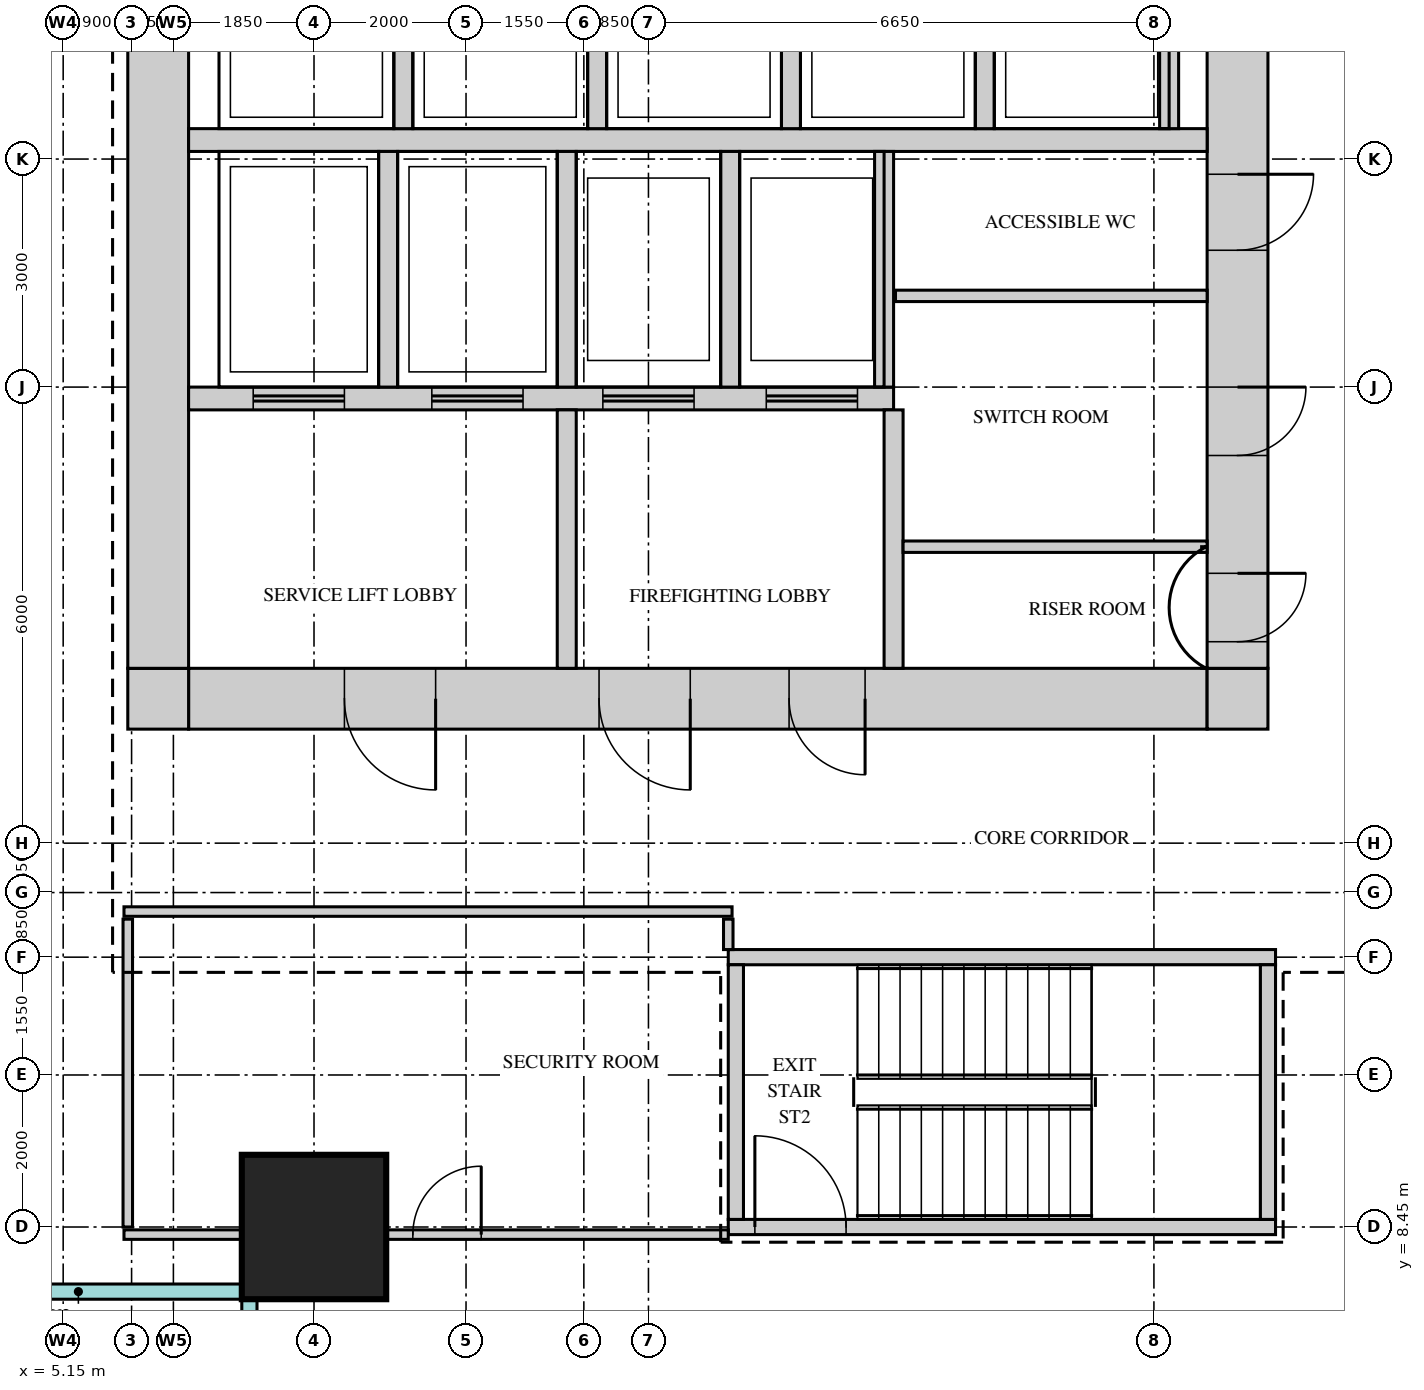
"""IFC4 building model, lengths in metres.
Left out: names, types, materials, properties, quantities, classifications, styles, units other than length and angle.
Written with IfcOpenShell. Run it as: python <this file> out.ifc"""

import sys

from ifc_helpers import new_model, si_unit, direction, frame, frame_2d, origin, origin_2d, place, context, subcontext, project, spatial, rectangle, extrude, source, transform, mapped, element, fill, save


model = new_model("IFC4")
c1 = context("Model", 3, precision=1e-05, world=origin(), true_north=direction((0.0, 1.0)))
c2 = subcontext(c1, "Body", "Model", "MODEL_VIEW")
j1 = project(units=[si_unit("LENGTHUNIT", "METRE"), si_unit("PLANEANGLEUNIT", "RADIAN")], contexts=[c1])
p1 = place(None, origin())
s1 = spatial("IfcSite", under=j1, at=p1, CompositionType="ELEMENT")
p2 = place(p1, origin())
s2 = spatial("IfcBuilding", under=s1, at=p2, CompositionType="ELEMENT")
p3 = place(p2, frame((0.0, 0.0, 204.7)))
s3 = spatial("IfcBuildingStorey", under=s2, at=p3, CompositionType="ELEMENT", Elevation=204.7)
m1 = source(origin(), c2, "Body", "SweptSolid", [
    extrude(rectangle(XDim=13.4, YDim=0.8, at=frame_2d((6.7, 0.0))), origin(), (0.0, 0.0, 1.0), 3.75),
])
p4 = place(p3, frame((6.8, 15.4, 0.0), z_axis=(0.0, 0.0, 1.0), x_axis=(1.0, 0.0, 0.0)))
e1 = element("IfcWall", 1, at=p4, inside=s3, PredefinedType="SHEAR", context=c2, shape_type="MappedRepresentation", body=[
    mapped(m1, transform((0.0, 0.0, 0.0))),
])
m2 = source(origin(), c2, "Body", "SweptSolid", [
    extrude(rectangle(XDim=1.2, YDim=2.1, at=frame_2d((0.6, 1.05))), frame((0.0, 0.41, 0.0), z_axis=(0.0, -1.0, 0.0), x_axis=(1.0, 0.0, 0.0)), (0.0, 0.0, 1.0), 0.82),
])
p5 = place(p4, frame((5.4, 0.0, 0.0)))
e2 = element("IfcOpeningElement", 2, at=p5, cuts=e1, PredefinedType="OPENING", context=c2, shape_type="MappedRepresentation", body=[
    mapped(m2, transform((0.0, 0.0, 0.0))),
])
p6 = place(p4, frame((2.05, 0.0, 0.0)))
e3 = element("IfcOpeningElement", 3, at=p6, cuts=e1, PredefinedType="OPENING", context=c2, shape_type="MappedRepresentation", body=[
    mapped(m2, transform((0.0, 0.0, 0.0))),
])
m3 = source(origin(), c2, "Body", "SweptSolid", [
    extrude(rectangle(XDim=1.0, YDim=2.1, at=frame_2d((0.5, 1.05))), frame((0.0, 0.41, 0.0), z_axis=(0.0, -1.0, 0.0), x_axis=(1.0, 0.0, 0.0)), (0.0, 0.0, 1.0), 0.82),
])
p7 = place(p4, frame((7.9, 0.0, 0.0)))
e4 = element("IfcOpeningElement", 4, at=p7, cuts=e1, PredefinedType="OPENING", context=c2, shape_type="MappedRepresentation", body=[
    mapped(m3, transform((0.0, 0.0, 0.0))),
])
m4 = source(origin(), c2, "Body", "SweptSolid", [
    extrude(rectangle(XDim=0.8, YDim=0.8, at=frame_2d((0.4, 0.0))), origin(), (0.0, 0.0, 1.0), 3.75),
])
for number, where, z_axis, x_axis in (
    (5, (20.2, 15.4, 0.0), (0.0, 0.0, 1.0), (1.0, 0.0, 0.0)),
    (6, (6.0, 15.4, 0.0), (0.0, 0.0, 1.0), (1.0, 0.0, 0.0)),
):
    element("IfcWall", number, at=place(p3, frame(where, z_axis=z_axis, x_axis=x_axis)), inside=s3, PredefinedType="SHEAR", context=c2, shape_type="MappedRepresentation", body=[
        mapped(m4, transform((0.0, 0.0, 0.0))),
    ])
m5 = source(origin(), c2, "Body", "SweptSolid", [
    extrude(rectangle(XDim=22.4, YDim=0.8, at=frame_2d((11.2, 0.0))), origin(), (0.0, 0.0, 1.0), 3.75),
])
p8 = place(p3, frame((20.6, 15.8, 0.0), z_axis=(0.0, 0.0, 1.0), x_axis=(0.0, 1.0, 0.0)))
e7 = element("IfcWall", 7, at=p8, inside=s3, PredefinedType="SHEAR", context=c2, shape_type="MappedRepresentation", body=[
    mapped(m5, transform((0.0, 0.0, 0.0))),
])
m6 = source(origin(), c2, "Body", "SweptSolid", [
    extrude(rectangle(XDim=1.8, YDim=2.1, at=frame_2d((0.9, 1.05))), frame((0.0, 0.41, 0.0), z_axis=(0.0, -1.0, 0.0), x_axis=(1.0, 0.0, 0.0)), (0.0, 0.0, 1.0), 0.82),
])
p9 = place(p8, frame((10.7, 0.0, 0.0)))
e8 = element("IfcOpeningElement", 8, at=p9, cuts=e7, PredefinedType="OPENING", context=c2, shape_type="MappedRepresentation", body=[
    mapped(m6, transform((0.0, 0.0, 0.0))),
])
m7 = source(origin(), c2, "Body", "SweptSolid", [
    extrude(rectangle(XDim=0.9, YDim=2.1, at=frame_2d((0.45, 1.05))), frame((0.0, 0.41, 0.0), z_axis=(0.0, -1.0, 0.0), x_axis=(1.0, 0.0, 0.0)), (0.0, 0.0, 1.0), 0.82),
])
p10 = place(p8, frame((0.35, 0.0, 0.0)))
e9 = element("IfcOpeningElement", 9, at=p10, cuts=e7, PredefinedType="OPENING", context=c2, shape_type="MappedRepresentation", body=[
    mapped(m7, transform((0.0, 0.0, 0.0))),
])
p11 = place(p8, frame((2.8, 0.0, 0.0)))
e10 = element("IfcOpeningElement", 10, at=p11, cuts=e7, PredefinedType="OPENING", context=c2, shape_type="MappedRepresentation", body=[
    mapped(m7, transform((0.0, 0.0, 0.0))),
])
p12 = place(p8, frame((5.5, 0.0, 0.0)))
e11 = element("IfcOpeningElement", 11, at=p12, cuts=e7, PredefinedType="OPENING", context=c2, shape_type="MappedRepresentation", body=[
    mapped(m3, transform((0.0, 0.0, 0.0))),
])
p13 = place(p3, frame((6.4, 15.8, 0.0), z_axis=(0.0, 0.0, 1.0), x_axis=(0.0, 1.0, 0.0)))
e12 = element("IfcWall", 12, at=p13, inside=s3, PredefinedType="SHEAR", context=c2, shape_type="MappedRepresentation", body=[
    mapped(m5, transform((0.0, 0.0, 0.0))),
])
m8 = source(origin(), c2, "Body", "SweptSolid", [
    extrude(rectangle(XDim=7.2, YDim=0.2, at=frame_2d((3.6, 0.0))), origin(), (0.0, 0.0, 1.0), 3.75),
])
p14 = place(p3, frame((13.9, 12.0, 0.0), z_axis=(0.0, 0.0, 1.0), x_axis=(1.0, 0.0, 0.0)))
e13 = element("IfcWall", 13, at=p14, inside=s3, PredefinedType="SHEAR", context=c2, shape_type="MappedRepresentation", body=[
    mapped(m8, transform((0.0, 0.0, 0.0))),
])
p15 = place(p3, frame((13.9, 8.45, 0.0), z_axis=(0.0, 0.0, 1.0), x_axis=(1.0, 0.0, 0.0)))
e14 = element("IfcWall", 14, at=p15, inside=s3, PredefinedType="SHEAR", context=c2, shape_type="MappedRepresentation", body=[
    mapped(m8, transform((0.0, 0.0, 0.0))),
])
m9 = source(origin(), c2, "Body", "SweptSolid", [
    extrude(rectangle(XDim=1.2, YDim=2.1, at=frame_2d((0.6, 1.05))), frame((0.0, 0.11, 0.0), z_axis=(0.0, -1.0, 0.0), x_axis=(1.0, 0.0, 0.0)), (0.0, 0.0, 1.0), 0.22),
])
p16 = place(p15, frame((0.35, 0.0, 0.0)))
e15 = element("IfcOpeningElement", 15, at=p16, cuts=e14, PredefinedType="OPENING", context=c2, shape_type="MappedRepresentation", body=[
    mapped(m9, transform((0.0, 0.0, 0.0))),
])
m10 = source(origin(), c2, "Body", "SweptSolid", [
    extrude(rectangle(XDim=3.35, YDim=0.2, at=frame_2d((1.675, 0.0))), origin(), (0.0, 0.0, 1.0), 3.75),
])
for number, where, z_axis, x_axis in (
    (16, (21.0, 8.55, 0.0), (0.0, 0.0, 1.0), (0.0, 1.0, 0.0)),
    (17, (14.0, 8.55, 0.0), (0.0, 0.0, 1.0), (0.0, 1.0, 0.0)),
):
    element("IfcWall", number, at=place(p3, frame(where, z_axis=z_axis, x_axis=x_axis)), inside=s3, PredefinedType="SHEAR", context=c2, shape_type="MappedRepresentation", body=[
        mapped(m10, transform((0.0, 0.0, 0.0))),
    ])
m11 = source(origin(), c2, "Body", "SweptSolid", [
    extrude(rectangle(XDim=13.4, YDim=0.3, at=frame_2d((6.7, 0.0))), origin(), (0.0, 0.0, 1.0), 3.75),
])
p17 = place(p3, frame((6.8, 22.75, 0.0), z_axis=(0.0, 0.0, 1.0), x_axis=(1.0, 0.0, 0.0)))
e18 = element("IfcWall", 18, at=p17, inside=s3, PredefinedType="STANDARD", context=c2, shape_type="MappedRepresentation", body=[
    mapped(m11, transform((0.0, 0.0, 0.0))),
])
m12 = source(origin(), c2, "Body", "SweptSolid", [
    extrude(rectangle(XDim=9.275, YDim=0.3, at=frame_2d((4.637, 0.0))), origin(), (0.0, 0.0, 1.0), 3.75),
])
p18 = place(p3, frame((6.8, 19.35, 0.0), z_axis=(0.0, 0.0, 1.0), x_axis=(1.0, 0.0, 0.0)))
e19 = element("IfcWall", 19, at=p18, inside=s3, PredefinedType="STANDARD", context=c2, shape_type="MappedRepresentation", body=[
    mapped(m12, transform((0.0, 0.0, 0.0))),
])
m13 = source(origin(), c2, "Body", "SweptSolid", [
    extrude(rectangle(XDim=1.2, YDim=2.1, at=frame_2d((0.6, 1.05))), frame((0.0, 0.16, 0.0), z_axis=(0.0, -1.0, 0.0), x_axis=(1.0, 0.0, 0.0)), (0.0, 0.0, 1.0), 0.32),
])
p19 = place(p18, frame((0.85, 0.0, 0.0)))
e20 = element("IfcOpeningElement", 20, at=p19, cuts=e19, PredefinedType="OPENING", context=c2, shape_type="MappedRepresentation", body=[
    mapped(m13, transform((0.0, 0.0, 0.0))),
])
p20 = place(p18, frame((3.2, 0.0, 0.0)))
e21 = element("IfcOpeningElement", 21, at=p20, cuts=e19, PredefinedType="OPENING", context=c2, shape_type="MappedRepresentation", body=[
    mapped(m13, transform((0.0, 0.0, 0.0))),
])
p21 = place(p18, frame((5.45, 0.0, 0.0)))
e22 = element("IfcOpeningElement", 22, at=p21, cuts=e19, PredefinedType="OPENING", context=c2, shape_type="MappedRepresentation", body=[
    mapped(m13, transform((0.0, 0.0, 0.0))),
])
p22 = place(p18, frame((7.6, 0.0, 0.0)))
e23 = element("IfcOpeningElement", 23, at=p22, cuts=e19, PredefinedType="OPENING", context=c2, shape_type="MappedRepresentation", body=[
    mapped(m13, transform((0.0, 0.0, 0.0))),
])
m14 = source(origin(), c2, "Body", "SweptSolid", [
    extrude(rectangle(XDim=3.1, YDim=0.25, at=frame_2d((1.55, 0.0))), origin(), (0.0, 0.0, 1.0), 3.75),
])
for number, where, z_axis, x_axis in (
    (24, (9.425, 19.5, 0.0), (0.0, 0.0, 1.0), (0.0, 1.0, 0.0)),
    (25, (11.775, 19.5, 0.0), (0.0, 0.0, 1.0), (0.0, 1.0, 0.0)),
    (26, (13.925, 19.5, 0.0), (0.0, 0.0, 1.0), (0.0, 1.0, 0.0)),
    (27, (15.95, 19.5, 0.0), (0.0, 0.0, 1.0), (0.0, 1.0, 0.0)),
):
    element("IfcWall", number, at=place(p3, frame(where, z_axis=z_axis, x_axis=x_axis)), inside=s3, PredefinedType="STANDARD", context=c2, shape_type="MappedRepresentation", body=[
        mapped(m14, transform((0.0, 0.0, 0.0))),
    ])
m15 = source(origin(), c2, "Body", "SweptSolid", [
    extrude(rectangle(XDim=2.4, YDim=0.25, at=frame_2d((1.2, 0.0))), origin(), (0.0, 0.0, 1.0), 3.75),
])
for number, where, z_axis, x_axis in (
    (28, (17.275, 22.9, 0.0), (0.0, 0.0, 1.0), (0.0, 1.0, 0.0)),
    (29, (19.7, 22.9, 0.0), (0.0, 0.0, 1.0), (0.0, 1.0, 0.0)),
    (30, (9.625, 22.9, 0.0), (0.0, 0.0, 1.0), (0.0, 1.0, 0.0)),
    (31, (12.175, 22.9, 0.0), (0.0, 0.0, 1.0), (0.0, 1.0, 0.0)),
    (32, (14.725, 22.9, 0.0), (0.0, 0.0, 1.0), (0.0, 1.0, 0.0)),
):
    element("IfcWall", number, at=place(p3, frame(where, z_axis=z_axis, x_axis=x_axis)), inside=s3, PredefinedType="STANDARD", context=c2, shape_type="MappedRepresentation", body=[
        mapped(m15, transform((0.0, 0.0, 0.0))),
    ])
m16 = source(origin(), c2, "Body", "SweptSolid", [
    extrude(rectangle(XDim=3.4, YDim=0.25, at=frame_2d((1.7, 0.0))), origin(), (0.0, 0.0, 1.0), 3.75),
])
for number, where, z_axis, x_axis in (
    (33, (16.075, 15.8, 0.0), (0.0, 0.0, 1.0), (0.0, 1.0, 0.0)),
    (34, (11.775, 15.8, 0.0), (0.0, 0.0, 1.0), (0.0, 1.0, 0.0)),
):
    element("IfcWall", number, at=place(p3, frame(where, z_axis=z_axis, x_axis=x_axis)), inside=s3, PredefinedType="STANDARD", context=c2, shape_type="MappedRepresentation", body=[
        mapped(m16, transform((0.0, 0.0, 0.0))),
    ])
m17 = source(origin(), c2, "Body", "SweptSolid", [
    extrude(rectangle(XDim=1.9, YDim=1.9, at=origin_2d()), origin(), (0.0, 0.0, 1.0), 4.0),
])
p23 = place(p3, frame((8.45, 8.45, 0.0), z_axis=(0.0, 0.0, 1.0), x_axis=(1.0, 0.0, 0.0)))
e35 = element("IfcColumn", 35, at=p23, inside=s3, PredefinedType="COLUMN", context=c2, shape_type="MappedRepresentation", body=[
    mapped(m17, transform((0.0, 0.0, 0.0))),
])
m18 = source(origin(), c2, "Body", "SweptSolid", [
    extrude(rectangle(XDim=7.95, YDim=0.125, at=frame_2d((3.975, 0.0))), origin(), (0.0, 0.0, 1.0), 3.25),
])
p24 = place(p3, frame((5.95, 8.35, 0.0), z_axis=(0.0, 0.0, 1.0), x_axis=(1.0, 0.0, 0.0)))
e36 = element("IfcWall", 36, at=p24, inside=s3, PredefinedType="PARTITIONING", context=c2, shape_type="MappedRepresentation", body=[
    mapped(m18, transform((0.0, 0.0, 0.0))),
])
m19 = source(origin(), c2, "Body", "SweptSolid", [
    extrude(rectangle(XDim=0.9, YDim=2.1, at=frame_2d((0.45, 1.05))), frame((0.0, 0.073, 0.0), z_axis=(0.0, -1.0, 0.0), x_axis=(1.0, 0.0, 0.0)), (0.0, 0.0, 1.0), 0.145),
])
p25 = place(p24, frame((3.8, 0.0, 0.0)))
e37 = element("IfcOpeningElement", 37, at=p25, cuts=e36, PredefinedType="OPENING", context=c2, shape_type="MappedRepresentation", body=[
    mapped(m19, transform((0.0, 0.0, 0.0))),
])
m20 = source(origin(), c2, "Body", "SweptSolid", [
    extrude(rectangle(XDim=4.05, YDim=0.125, at=frame_2d((2.025, 0.0))), origin(), (0.0, 0.0, 1.0), 3.8),
])
p26 = place(p3, frame((6.0, 8.45, 0.0), z_axis=(0.0, 0.0, 1.0), x_axis=(0.0, 1.0, 0.0)))
e38 = element("IfcWall", 38, at=p26, inside=s3, PredefinedType="PARTITIONING", context=c2, shape_type="MappedRepresentation", body=[
    mapped(m20, transform((0.0, 0.0, 0.0))),
])
m21 = source(origin(), c2, "Body", "SweptSolid", [
    extrude(rectangle(XDim=0.4, YDim=0.125, at=frame_2d((0.2, 0.0))), origin(), (0.0, 0.0, 1.0), 3.8),
])
p27 = place(p3, frame((13.9, 12.1, 0.0), z_axis=(0.0, 0.0, 1.0), x_axis=(0.0, 1.0, 0.0)))
e39 = element("IfcWall", 39, at=p27, inside=s3, PredefinedType="PARTITIONING", context=c2, shape_type="MappedRepresentation", body=[
    mapped(m21, transform((0.0, 0.0, 0.0))),
])
m22 = source(origin(), c2, "Body", "SweptSolid", [
    extrude(rectangle(XDim=8.0, YDim=0.125, at=frame_2d((4.0, 0.0))), origin(), (0.0, 0.0, 1.0), 3.8),
])
p28 = place(p3, frame((5.95, 12.6, 0.0), z_axis=(0.0, 0.0, 1.0), x_axis=(1.0, 0.0, 0.0)))
e40 = element("IfcWall", 40, at=p28, inside=s3, PredefinedType="PARTITIONING", context=c2, shape_type="MappedRepresentation", body=[
    mapped(m22, transform((0.0, 0.0, 0.0))),
])
m23 = source(origin(), c2, "Body", "SweptSolid", [
    extrude(rectangle(XDim=4.0, YDim=0.15, at=frame_2d((2.0, 0.0))), origin(), (0.0, 0.0, 1.0), 3.8),
])
p29 = place(p3, frame((16.2, 17.4, 0.0), z_axis=(0.0, 0.0, 1.0), x_axis=(1.0, 0.0, 0.0)))
e41 = element("IfcWall", 41, at=p29, inside=s3, PredefinedType="PARTITIONING", context=c2, shape_type="MappedRepresentation", body=[
    mapped(m23, transform((0.0, 0.0, 0.0))),
])
m24 = source(origin(), c2, "Body", "SweptSolid", [
    extrude(rectangle(XDim=4.1, YDim=0.15, at=frame_2d((2.05, 0.0))), origin(), (0.0, 0.0, 1.0), 3.8),
])
p30 = place(p3, frame((16.1, 20.7, 0.0), z_axis=(0.0, 0.0, 1.0), x_axis=(1.0, 0.0, 0.0)))
e42 = element("IfcWall", 42, at=p30, inside=s3, PredefinedType="PARTITIONING", context=c2, shape_type="MappedRepresentation", body=[
    mapped(m24, transform((0.0, 0.0, 0.0))),
])
m25 = source(origin(), c2, "Body", "SweptSolid", [
    extrude(rectangle(XDim=0.9, YDim=2.1, at=frame_2d((0.45, 1.05))), frame((0.0, 0.35, 0.0), z_axis=(0.0, -1.0, 0.0), x_axis=(1.0, 0.0, 0.0)), (0.0, 0.0, 1.0), 0.7),
])
p31 = place(p10, origin())
e43 = element("IfcDoor", 43, at=p31, inside=s3, OperationType="SINGLE_SWING_RIGHT", PredefinedType="DOOR", context=c2, shape_type="MappedRepresentation", body=[
    mapped(m25, transform((0.0, 0.0, 0.0))),
])
fill(e9, e43)
p32 = place(p11, origin())
e44 = element("IfcDoor", 44, at=p32, inside=s3, OperationType="SINGLE_SWING_RIGHT", PredefinedType="DOOR", context=c2, shape_type="MappedRepresentation", body=[
    mapped(m25, transform((0.0, 0.0, 0.0))),
])
fill(e10, e44)
m26 = source(origin(), c2, "Body", "SweptSolid", [
    extrude(rectangle(XDim=1.0, YDim=2.1, at=frame_2d((0.5, 1.05))), frame((0.0, 0.35, 0.0), z_axis=(0.0, -1.0, 0.0), x_axis=(1.0, 0.0, 0.0)), (0.0, 0.0, 1.0), 0.7),
])
p33 = place(p12, origin())
e45 = element("IfcDoor", 45, at=p33, inside=s3, OperationType="SINGLE_SWING_RIGHT", PredefinedType="DOOR", context=c2, shape_type="MappedRepresentation", body=[
    mapped(m26, transform((0.0, 0.0, 0.0))),
])
fill(e11, e45)
m27 = source(origin(), c2, "Body", "SweptSolid", [
    extrude(rectangle(XDim=1.2, YDim=2.1, at=frame_2d((0.6, 1.05))), frame((0.0, 0.35, 0.0), z_axis=(0.0, -1.0, 0.0), x_axis=(1.0, 0.0, 0.0)), (0.0, 0.0, 1.0), 0.7),
])
p34 = place(p5, origin())
e46 = element("IfcDoor", 46, at=p34, inside=s3, OperationType="SINGLE_SWING_RIGHT", PredefinedType="DOOR", context=c2, shape_type="MappedRepresentation", body=[
    mapped(m27, transform((0.0, 0.0, 0.0))),
])
fill(e2, e46)
p35 = place(p6, origin())
e47 = element("IfcDoor", 47, at=p35, inside=s3, OperationType="SINGLE_SWING_RIGHT", PredefinedType="DOOR", context=c2, shape_type="MappedRepresentation", body=[
    mapped(m27, transform((0.0, 0.0, 0.0))),
])
fill(e3, e47)
p36 = place(p7, origin())
e48 = element("IfcDoor", 48, at=p36, inside=s3, OperationType="SINGLE_SWING_RIGHT", PredefinedType="DOOR", context=c2, shape_type="MappedRepresentation", body=[
    mapped(m26, transform((0.0, 0.0, 0.0))),
])
fill(e4, e48)
m28 = source(origin(), c2, "Body", "SweptSolid", [
    extrude(rectangle(XDim=0.9, YDim=2.1, at=frame_2d((0.45, 1.05))), frame((0.0, 0.025, 0.0), z_axis=(0.0, -1.0, 0.0), x_axis=(1.0, 0.0, 0.0)), (0.0, 0.0, 1.0), 0.05),
])
p37 = place(p25, origin())
e49 = element("IfcDoor", 49, at=p37, inside=s3, OperationType="SINGLE_SWING_LEFT", PredefinedType="DOOR", context=c2, shape_type="MappedRepresentation", body=[
    mapped(m28, transform((0.0, 0.0, 0.0))),
])
fill(e37, e49)
m29 = source(origin(), c2, "Body", "SweptSolid", [
    extrude(rectangle(XDim=1.2, YDim=2.1, at=frame_2d((0.6, 1.05))), frame((0.0, 0.025, 0.0), z_axis=(0.0, -1.0, 0.0), x_axis=(1.0, 0.0, 0.0)), (0.0, 0.0, 1.0), 0.05),
])
p38 = place(p16, origin())
e50 = element("IfcDoor", 50, at=p38, inside=s3, OperationType="SINGLE_SWING_RIGHT", PredefinedType="DOOR", context=c2, shape_type="MappedRepresentation", body=[
    mapped(m29, transform((0.0, 0.0, 0.0))),
])
fill(e15, e50)
p39 = place(p19, origin())
e51 = element("IfcDoor", 51, at=p39, inside=s3, OperationType="DOUBLE_DOOR_SLIDING", PredefinedType="DOOR", context=c2, shape_type="MappedRepresentation", body=[
    mapped(m29, transform((0.0, 0.0, 0.0))),
])
fill(e20, e51)
p40 = place(p20, origin())
e52 = element("IfcDoor", 52, at=p40, inside=s3, OperationType="DOUBLE_DOOR_SLIDING", PredefinedType="DOOR", context=c2, shape_type="MappedRepresentation", body=[
    mapped(m29, transform((0.0, 0.0, 0.0))),
])
fill(e21, e52)
p41 = place(p21, origin())
e53 = element("IfcDoor", 53, at=p41, inside=s3, OperationType="DOUBLE_DOOR_SLIDING", PredefinedType="DOOR", context=c2, shape_type="MappedRepresentation", body=[
    mapped(m29, transform((0.0, 0.0, 0.0))),
])
fill(e22, e53)
p42 = place(p22, origin())
e54 = element("IfcDoor", 54, at=p42, inside=s3, OperationType="DOUBLE_DOOR_SLIDING", PredefinedType="DOOR", context=c2, shape_type="MappedRepresentation", body=[
    mapped(m29, transform((0.0, 0.0, 0.0))),
])
fill(e23, e54)
save(model, sys.argv[1])
